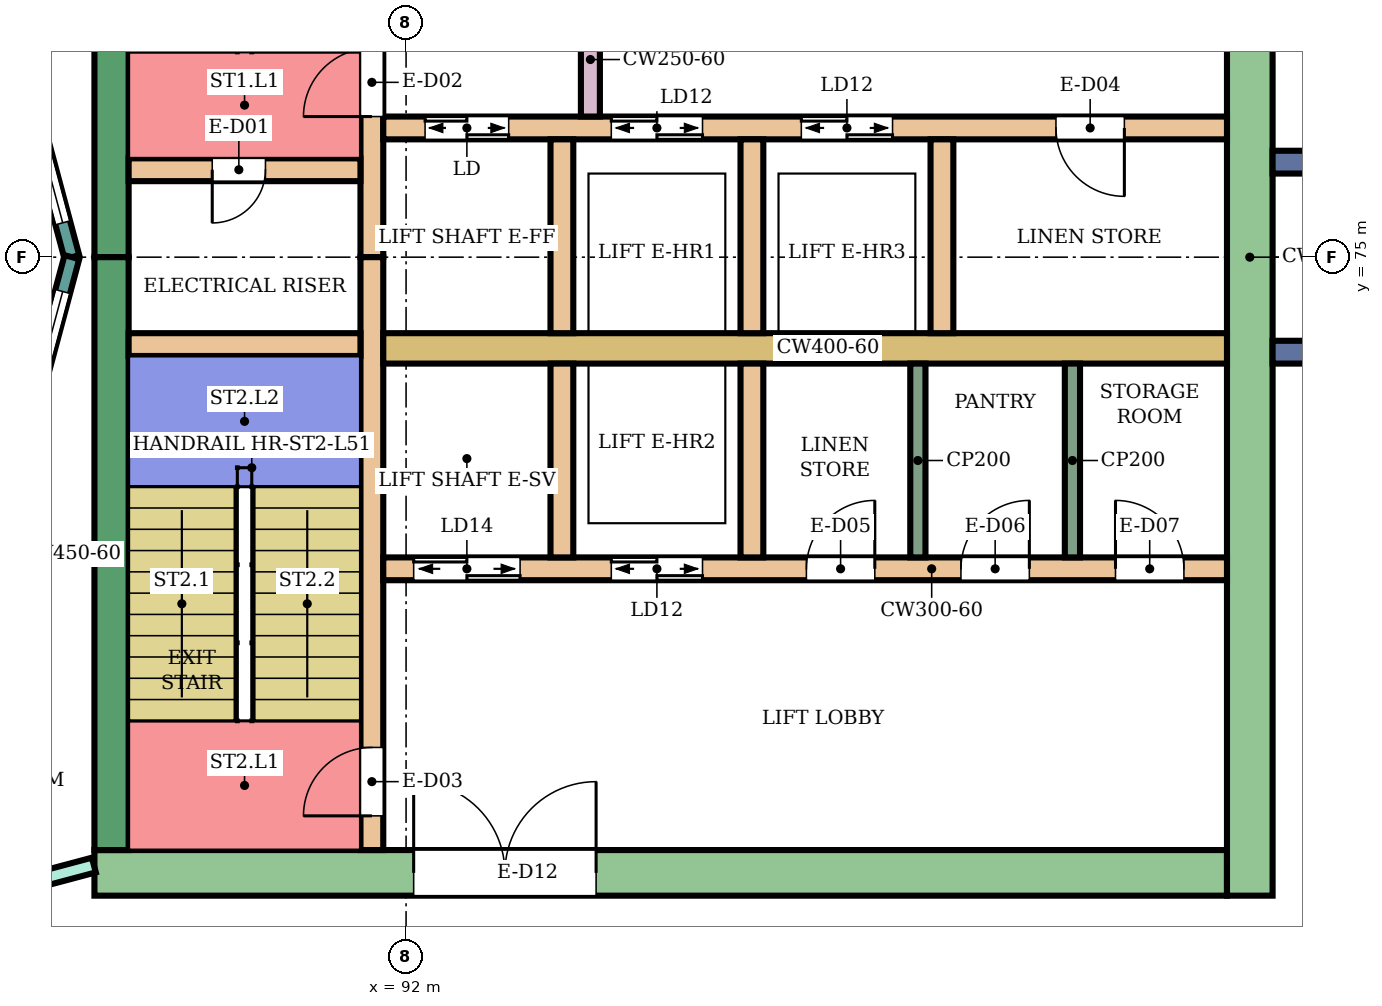
"""IFC4 building model, lengths in metres.
Left out: names, types, materials, properties, quantities, classifications, styles, units other than length and angle.
Written with IfcOpenShell. Run it as: python <this file> out.ifc"""

import sys

from ifc_helpers import new_model, si_unit, direction, frame, frame_2d, origin, place, context, subcontext, project, spatial, rectangle, extrude, element, fill, save


model = new_model("IFC4")
c1 = context("Model", 3, precision=1e-05, world=origin(), true_north=direction((0.0, 1.0)))
c2 = subcontext(c1, "Body", "Model", "MODEL_VIEW")
j1 = project(units=[si_unit("LENGTHUNIT", "METRE"), si_unit("PLANEANGLEUNIT", "RADIAN")], contexts=[c1])
p1 = place(None, origin())
s1 = spatial("IfcSite", under=j1, at=p1, CompositionType="ELEMENT")
p2 = place(p1, origin())
s2 = spatial("IfcBuilding", under=s1, at=p2, CompositionType="ELEMENT")
p3 = place(p2, frame((0.0, 0.0, 220.9)))
s3 = spatial("IfcBuildingStorey", under=s2, at=p3, CompositionType="ELEMENT", Elevation=220.9)
p4 = place(p3, frame((87.9, 66.9, 0.0), z_axis=(0.0, 0.0, 1.0), x_axis=(1.0, 0.0, 0.0)))
e1 = element("IfcWall", 1, at=p4, inside=s3, PredefinedType="SHEAR", context=c2, shape_type="SweptSolid", body=[
    extrude(rectangle(XDim=14.9, YDim=0.6, at=frame_2d((7.45, 0.0))), origin(), (0.0, 0.0, 1.0), 3.88),
])
p5 = place(p4, frame((4.2, 0.0, 0.0)))
e2 = element("IfcOpeningElement", 2, at=p5, cuts=e1, PredefinedType="OPENING", context=c2, shape_type="SweptSolid", body=[
    extrude(rectangle(XDim=2.4, YDim=2.4, at=frame_2d((1.2, 1.2))), frame((0.0, 0.31, 0.0), z_axis=(0.0, -1.0, 0.0), x_axis=(1.0, 0.0, 0.0)), (0.0, 0.0, 1.0), 0.62),
])
for number, where, z_axis, x_axis in (
    (3, (88.125, 75.0, 0.0), (0.0, 0.0, 1.0), (0.0, 1.0, 0.0)),
    (4, (88.125, 67.2, 0.0), (0.0, 0.0, 1.0), (0.0, 1.0, 0.0)),
):
    element("IfcWall", number, at=place(p3, frame(where, z_axis=z_axis, x_axis=x_axis)), inside=s3, PredefinedType="SHEAR", context=c2, shape_type="SweptSolid", body=[
        extrude(rectangle(XDim=7.8, YDim=0.45, at=frame_2d((3.9, 0.0))), origin(), (0.0, 0.0, 1.0), 3.88),
    ])
p6 = place(p3, frame((103.1, 66.6, 0.0), z_axis=(0.0, 0.0, 1.0), x_axis=(0.0, 1.0, 0.0)))
e5 = element("IfcWall", 5, at=p6, inside=s3, PredefinedType="SHEAR", context=c2, shape_type="SweptSolid", body=[
    extrude(rectangle(XDim=16.8, YDim=0.6, at=frame_2d((8.4, 0.0))), origin(), (0.0, 0.0, 1.0), 3.88),
])
p7 = place(p3, frame((91.55, 75.0, 0.0), z_axis=(0.0, 0.0, 1.0), x_axis=(0.0, 1.0, 0.0)))
e6 = element("IfcWall", 6, at=p7, inside=s3, PredefinedType="SHEAR", context=c2, shape_type="SweptSolid", body=[
    extrude(rectangle(XDim=7.8, YDim=0.3, at=frame_2d((3.9, 0.0))), origin(), (0.0, 0.0, 1.0), 3.88),
])
p8 = place(p7, frame((1.85, 0.0, 0.0)))
e7 = element("IfcOpeningElement", 7, at=p8, cuts=e6, PredefinedType="OPENING", context=c2, shape_type="SweptSolid", body=[
    extrude(rectangle(XDim=0.9, YDim=2.1, at=frame_2d((0.45, 1.05))), frame((0.0, 0.16, 0.0), z_axis=(0.0, -1.0, 0.0), x_axis=(1.0, 0.0, 0.0)), (0.0, 0.0, 1.0), 0.32),
])
p9 = place(p3, frame((91.55, 67.2, 0.0), z_axis=(0.0, 0.0, 1.0), x_axis=(0.0, 1.0, 0.0)))
e8 = element("IfcWall", 8, at=p9, inside=s3, PredefinedType="SHEAR", context=c2, shape_type="SweptSolid", body=[
    extrude(rectangle(XDim=7.8, YDim=0.3, at=frame_2d((3.9, 0.0))), origin(), (0.0, 0.0, 1.0), 3.88),
])
p10 = place(p9, frame((0.45, 0.0, 0.0)))
e9 = element("IfcOpeningElement", 9, at=p10, cuts=e8, PredefinedType="OPENING", context=c2, shape_type="SweptSolid", body=[
    extrude(rectangle(XDim=0.9, YDim=2.1, at=frame_2d((0.45, 1.05))), frame((0.0, 0.16, 0.0), z_axis=(0.0, -1.0, 0.0), x_axis=(1.0, 0.0, 0.0)), (0.0, 0.0, 1.0), 0.32),
])
p11 = place(p3, frame((88.35, 76.15, 0.0), z_axis=(0.0, 0.0, 1.0), x_axis=(1.0, 0.0, 0.0)))
e10 = element("IfcWall", 10, at=p11, inside=s3, PredefinedType="SHEAR", context=c2, shape_type="SweptSolid", body=[
    extrude(rectangle(XDim=3.05, YDim=0.3, at=frame_2d((1.525, 0.0))), origin(), (0.0, 0.0, 1.0), 3.88),
])
p12 = place(p11, frame((1.1, 0.0, 0.0)))
e11 = element("IfcOpeningElement", 11, at=p12, cuts=e10, PredefinedType="OPENING", context=c2, shape_type="SweptSolid", body=[
    extrude(rectangle(XDim=0.7, YDim=2.0, at=frame_2d((0.35, 1.0))), frame((0.0, 0.16, 0.0), z_axis=(0.0, -1.0, 0.0), x_axis=(1.0, 0.0, 0.0)), (0.0, 0.0, 1.0), 0.32),
])
p13 = place(p3, frame((88.35, 73.85, 0.0), z_axis=(0.0, 0.0, 1.0), x_axis=(1.0, 0.0, 0.0)))
e12 = element("IfcWall", 12, at=p13, inside=s3, PredefinedType="SHEAR", context=c2, shape_type="SweptSolid", body=[
    extrude(rectangle(XDim=3.05, YDim=0.3, at=frame_2d((1.525, 0.0))), origin(), (0.0, 0.0, 1.0), 3.88),
])
p14 = place(p3, frame((91.7, 76.7, 0.0), z_axis=(0.0, 0.0, 1.0), x_axis=(1.0, 0.0, 0.0)))
e13 = element("IfcWall", 13, at=p14, inside=s3, PredefinedType="SHEAR", context=c2, shape_type="SweptSolid", body=[
    extrude(rectangle(XDim=11.1, YDim=0.3, at=frame_2d((5.55, 0.0))), origin(), (0.0, 0.0, 1.0), 3.88),
])
p15 = place(p14, frame((0.55, 0.0, 0.0)))
e14 = element("IfcOpeningElement", 14, at=p15, cuts=e13, PredefinedType="OPENING", context=c2, shape_type="SweptSolid", body=[
    extrude(rectangle(XDim=1.1, YDim=2.1, at=frame_2d((0.55, 1.05))), frame((0.0, 0.16, 0.0), z_axis=(0.0, -1.0, 0.0), x_axis=(1.0, 0.0, 0.0)), (0.0, 0.0, 1.0), 0.32),
])
p16 = place(p14, frame((3.0, 0.0, 0.0)))
e15 = element("IfcOpeningElement", 15, at=p16, cuts=e13, PredefinedType="OPENING", context=c2, shape_type="SweptSolid", body=[
    extrude(rectangle(XDim=1.2, YDim=2.1, at=frame_2d((0.6, 1.05))), frame((0.0, 0.16, 0.0), z_axis=(0.0, -1.0, 0.0), x_axis=(1.0, 0.0, 0.0)), (0.0, 0.0, 1.0), 0.32),
])
p17 = place(p14, frame((5.5, 0.0, 0.0)))
e16 = element("IfcOpeningElement", 16, at=p17, cuts=e13, PredefinedType="OPENING", context=c2, shape_type="SweptSolid", body=[
    extrude(rectangle(XDim=1.2, YDim=2.1, at=frame_2d((0.6, 1.05))), frame((0.0, 0.16, 0.0), z_axis=(0.0, -1.0, 0.0), x_axis=(1.0, 0.0, 0.0)), (0.0, 0.0, 1.0), 0.32),
])
p18 = place(p14, frame((8.85, 0.0, 0.0)))
e17 = element("IfcOpeningElement", 17, at=p18, cuts=e13, PredefinedType="OPENING", context=c2, shape_type="SweptSolid", body=[
    extrude(rectangle(XDim=0.9, YDim=2.1, at=frame_2d((0.45, 1.05))), frame((0.0, 0.16, 0.0), z_axis=(0.0, -1.0, 0.0), x_axis=(1.0, 0.0, 0.0)), (0.0, 0.0, 1.0), 0.32),
])
p19 = place(p3, frame((91.7, 73.8, 0.0), z_axis=(0.0, 0.0, 1.0), x_axis=(1.0, 0.0, 0.0)))
e18 = element("IfcWall", 18, at=p19, inside=s3, PredefinedType="SHEAR", context=c2, shape_type="SweptSolid", body=[
    extrude(rectangle(XDim=11.1, YDim=0.4, at=frame_2d((5.55, 0.0))), origin(), (0.0, 0.0, 1.0), 3.88),
])
p20 = place(p3, frame((91.7, 70.9, 0.0), z_axis=(0.0, 0.0, 1.0), x_axis=(1.0, 0.0, 0.0)))
e19 = element("IfcWall", 19, at=p20, inside=s3, PredefinedType="SHEAR", context=c2, shape_type="SweptSolid", body=[
    extrude(rectangle(XDim=11.1, YDim=0.3, at=frame_2d((5.55, 0.0))), origin(), (0.0, 0.0, 1.0), 3.88),
])
p21 = place(p20, frame((0.4, 0.0, 0.0)))
e20 = element("IfcOpeningElement", 20, at=p21, cuts=e19, PredefinedType="OPENING", context=c2, shape_type="SweptSolid", body=[
    extrude(rectangle(XDim=1.4, YDim=2.1, at=frame_2d((0.7, 1.05))), frame((0.0, 0.16, 0.0), z_axis=(0.0, -1.0, 0.0), x_axis=(1.0, 0.0, 0.0)), (0.0, 0.0, 1.0), 0.32),
])
p22 = place(p20, frame((3.0, 0.0, 0.0)))
e21 = element("IfcOpeningElement", 21, at=p22, cuts=e19, PredefinedType="OPENING", context=c2, shape_type="SweptSolid", body=[
    extrude(rectangle(XDim=1.2, YDim=2.1, at=frame_2d((0.6, 1.05))), frame((0.0, 0.16, 0.0), z_axis=(0.0, -1.0, 0.0), x_axis=(1.0, 0.0, 0.0)), (0.0, 0.0, 1.0), 0.32),
])
p23 = place(p20, frame((5.567, 0.0, 0.0)))
e22 = element("IfcOpeningElement", 22, at=p23, cuts=e19, PredefinedType="OPENING", context=c2, shape_type="SweptSolid", body=[
    extrude(rectangle(XDim=0.9, YDim=2.1, at=frame_2d((0.45, 1.05))), frame((0.0, 0.16, 0.0), z_axis=(0.0, -1.0, 0.0), x_axis=(1.0, 0.0, 0.0)), (0.0, 0.0, 1.0), 0.32),
])
p24 = place(p20, frame((7.6, 0.0, 0.0)))
e23 = element("IfcOpeningElement", 23, at=p24, cuts=e19, PredefinedType="OPENING", context=c2, shape_type="SweptSolid", body=[
    extrude(rectangle(XDim=0.9, YDim=2.1, at=frame_2d((0.45, 1.05))), frame((0.0, 0.16, 0.0), z_axis=(0.0, -1.0, 0.0), x_axis=(1.0, 0.0, 0.0)), (0.0, 0.0, 1.0), 0.32),
])
p25 = place(p20, frame((9.633, 0.0, 0.0)))
e24 = element("IfcOpeningElement", 24, at=p25, cuts=e19, PredefinedType="OPENING", context=c2, shape_type="SweptSolid", body=[
    extrude(rectangle(XDim=0.9, YDim=2.1, at=frame_2d((0.45, 1.05))), frame((0.0, 0.16, 0.0), z_axis=(0.0, -1.0, 0.0), x_axis=(1.0, 0.0, 0.0)), (0.0, 0.0, 1.0), 0.32),
])
for number, where, z_axis, x_axis in (
    (25, (94.05, 74.0, 0.0), (0.0, 0.0, 1.0), (0.0, 1.0, 0.0)),
    (26, (96.55, 74.0, 0.0), (0.0, 0.0, 1.0), (0.0, 1.0, 0.0)),
    (27, (99.05, 74.0, 0.0), (0.0, 0.0, 1.0), (0.0, 1.0, 0.0)),
    (28, (94.05, 71.05, 0.0), (0.0, 0.0, 1.0), (0.0, 1.0, 0.0)),
    (29, (96.55, 71.05, 0.0), (0.0, 0.0, 1.0), (0.0, 1.0, 0.0)),
):
    element("IfcWall", number, at=place(p3, frame(where, z_axis=z_axis, x_axis=x_axis)), inside=s3, PredefinedType="SHEAR", context=c2, shape_type="SweptSolid", body=[
        extrude(rectangle(XDim=2.55, YDim=0.3, at=frame_2d((1.275, 0.0))), origin(), (0.0, 0.0, 1.0), 3.88),
    ])
p26 = place(p3, frame((94.425, 76.85, 0.0), z_axis=(0.0, 0.0, 1.0), x_axis=(0.0, 1.0, 0.0)))
e30 = element("IfcWall", 30, at=p26, inside=s3, PredefinedType="SHEAR", context=c2, shape_type="SweptSolid", body=[
    extrude(rectangle(XDim=1.5, YDim=0.25, at=frame_2d((0.75, 0.0))), origin(), (0.0, 0.0, 1.0), 3.88),
])
for number, where, z_axis, x_axis in (
    (31, (103.4, 73.75, 0.0), (0.0, 0.0, 1.0), (1.0, 0.0, 0.0)),
    (32, (103.4, 76.25, 0.0), (0.0, 0.0, 1.0), (1.0, 0.0, 0.0)),
):
    element("IfcWall", number, at=place(p3, frame(where, z_axis=z_axis, x_axis=x_axis)), inside=s3, PredefinedType="NOTDEFINED", context=c2, shape_type="SweptSolid", body=[
        extrude(rectangle(XDim=2.416, YDim=0.3, at=frame_2d((1.208, 0.0))), origin(), (0.0, 0.0, 1.0), 4.2),
    ])
p27 = place(p3, frame((87.604, 75.0, 0.0), z_axis=(0.0, 0.0, 1.0), x_axis=(-0.258789828301, 0.965933654434, 0.0)))
e33 = element("IfcWall", 33, at=p27, inside=s3, PredefinedType="NOTDEFINED", context=c2, shape_type="SweptSolid", body=[
    extrude(rectangle(XDim=3.936, YDim=0.2, at=frame_2d((1.968, 0.0))), origin(), (0.0, 0.0, 1.0), 4.2),
])
p28 = place(p27, frame((0.468, 0.0, 0.9)))
e34 = element("IfcOpeningElement", 34, at=p28, cuts=e33, PredefinedType="OPENING", context=c2, shape_type="SweptSolid", body=[
    extrude(rectangle(XDim=3.0, YDim=2.3, at=frame_2d((1.5, 1.15))), frame((0.0, 0.11, 0.0), z_axis=(0.0, -1.0, 0.0), x_axis=(1.0, 0.0, 0.0)), (0.0, 0.0, 1.0), 0.22),
])
p29 = place(p3, frame((86.585, 71.198, 0.0), z_axis=(0.0, 0.0, 1.0), x_axis=(0.258789828301, 0.965933654434, 0.0)))
e35 = element("IfcWall", 35, at=p29, inside=s3, PredefinedType="NOTDEFINED", context=c2, shape_type="SweptSolid", body=[
    extrude(rectangle(XDim=3.936, YDim=0.2, at=frame_2d((1.968, 0.0))), origin(), (0.0, 0.0, 1.0), 4.2),
])
p30 = place(p29, frame((0.468, 0.0, 0.9)))
e36 = element("IfcOpeningElement", 36, at=p30, cuts=e35, PredefinedType="OPENING", context=c2, shape_type="SweptSolid", body=[
    extrude(rectangle(XDim=3.0, YDim=2.3, at=frame_2d((1.5, 1.15))), frame((0.0, 0.11, 0.0), z_axis=(0.0, -1.0, 0.0), x_axis=(1.0, 0.0, 0.0)), (0.0, 0.0, 1.0), 0.22),
])
p31 = place(p3, frame((80.125, 64.932, 0.0), z_axis=(0.0, 0.0, 1.0), x_axis=(0.966236955806, 0.257655089674, 0.0)))
e37 = element("IfcWall", 37, at=p31, inside=s3, PredefinedType="PARTITIONING", context=c2, shape_type="SweptSolid", body=[
    extrude(rectangle(XDim=8.039, YDim=0.2, at=frame_2d((4.02, 0.0))), origin(), (0.0, 0.0, 1.0), 3.75),
])
p32 = place(p31, frame((6.298, 0.0, 0.0)))
e38 = element("IfcOpeningElement", 38, at=p32, cuts=e37, PredefinedType="OPENING", context=c2, shape_type="SweptSolid", body=[
    extrude(rectangle(XDim=0.9, YDim=2.1, at=frame_2d((0.45, 1.05))), frame((0.0, 0.11, 0.0), z_axis=(0.0, -1.0, 0.0), x_axis=(1.0, 0.0, 0.0)), (0.0, 0.0, 1.0), 0.22),
])
p33 = place(p31, frame((2.045, 0.0, 0.0)))
e39 = element("IfcOpeningElement", 39, at=p33, cuts=e37, PredefinedType="OPENING", context=c2, shape_type="SweptSolid", body=[
    extrude(rectangle(XDim=0.9, YDim=2.1, at=frame_2d((0.45, 1.05))), frame((0.0, 0.11, 0.0), z_axis=(0.0, -1.0, 0.0), x_axis=(1.0, 0.0, 0.0)), (0.0, 0.0, 1.0), 0.22),
])
for number, where, z_axis, x_axis in (
    (40, (98.733, 71.05, 0.0), (0.0, 0.0, 1.0), (0.0, 1.0, 0.0)),
    (41, (100.767, 71.05, 0.0), (0.0, 0.0, 1.0), (0.0, 1.0, 0.0)),
):
    element("IfcWall", number, at=place(p3, frame(where, z_axis=z_axis, x_axis=x_axis)), inside=s3, PredefinedType="PARTITIONING", context=c2, shape_type="SweptSolid", body=[
        extrude(rectangle(XDim=2.55, YDim=0.2, at=frame_2d((1.275, 0.0))), origin(), (0.0, 0.0, 1.0), 3.88),
    ])
p34 = place(p28, origin())
e42 = element("IfcWindow", 42, at=p34, inside=s3, PartitioningType="SINGLE_PANEL", PredefinedType="WINDOW", context=c2, shape_type="SweptSolid", body=[
    extrude(rectangle(XDim=3.0, YDim=2.3, at=frame_2d((1.5, 1.15))), frame((0.0, 0.03, 0.0), z_axis=(0.0, -1.0, 0.0), x_axis=(1.0, 0.0, 0.0)), (0.0, 0.0, 1.0), 0.06),
])
fill(e34, e42)
p35 = place(p30, origin())
e43 = element("IfcWindow", 43, at=p35, inside=s3, PartitioningType="SINGLE_PANEL", PredefinedType="WINDOW", context=c2, shape_type="SweptSolid", body=[
    extrude(rectangle(XDim=3.0, YDim=2.3, at=frame_2d((1.5, 1.15))), frame((0.0, 0.03, 0.0), z_axis=(0.0, -1.0, 0.0), x_axis=(1.0, 0.0, 0.0)), (0.0, 0.0, 1.0), 0.06),
])
fill(e36, e43)
p36 = place(p12, frame((0.7, 0.0, 0.0), z_axis=(0.0, 0.0, 1.0), x_axis=(-1.0, 0.0, 0.0)))
e44 = element("IfcDoor", 44, at=p36, inside=s3, OperationType="SINGLE_SWING_RIGHT", PredefinedType="DOOR", context=c2, shape_type="SweptSolid", body=[
    extrude(rectangle(XDim=0.7, YDim=2.0, at=frame_2d((0.35, 1.0))), frame((0.0, 0.025, 0.0), z_axis=(0.0, -1.0, 0.0), x_axis=(1.0, 0.0, 0.0)), (0.0, 0.0, 1.0), 0.05),
])
fill(e11, e44)
p37 = place(p8, origin())
e45 = element("IfcDoor", 45, at=p37, inside=s3, OperationType="SINGLE_SWING_LEFT", PredefinedType="DOOR", context=c2, shape_type="SweptSolid", body=[
    extrude(rectangle(XDim=0.9, YDim=2.1, at=frame_2d((0.45, 1.05))), frame((0.0, 0.025, 0.0), z_axis=(0.0, -1.0, 0.0), x_axis=(1.0, 0.0, 0.0)), (0.0, 0.0, 1.0), 0.05),
])
fill(e7, e45)
p38 = place(p10, origin())
e46 = element("IfcDoor", 46, at=p38, inside=s3, OperationType="SINGLE_SWING_LEFT", PredefinedType="DOOR", context=c2, shape_type="SweptSolid", body=[
    extrude(rectangle(XDim=0.9, YDim=2.1, at=frame_2d((0.45, 1.05))), frame((0.0, 0.025, 0.0), z_axis=(0.0, -1.0, 0.0), x_axis=(1.0, 0.0, 0.0)), (0.0, 0.0, 1.0), 0.05),
])
fill(e9, e46)
p39 = place(p15, origin())
e47 = element("IfcDoor", 47, at=p39, inside=s3, OperationType="DOUBLE_DOOR_SLIDING", PredefinedType="DOOR", context=c2, shape_type="SweptSolid", body=[
    extrude(rectangle(XDim=1.1, YDim=2.1, at=frame_2d((0.55, 1.05))), frame((0.0, 0.025, 0.0), z_axis=(0.0, -1.0, 0.0), x_axis=(1.0, 0.0, 0.0)), (0.0, 0.0, 1.0), 0.05),
])
fill(e14, e47)
p40 = place(p16, origin())
e48 = element("IfcDoor", 48, at=p40, inside=s3, OperationType="DOUBLE_DOOR_SLIDING", PredefinedType="DOOR", context=c2, shape_type="SweptSolid", body=[
    extrude(rectangle(XDim=1.2, YDim=2.1, at=frame_2d((0.6, 1.05))), frame((0.0, 0.025, 0.0), z_axis=(0.0, -1.0, 0.0), x_axis=(1.0, 0.0, 0.0)), (0.0, 0.0, 1.0), 0.05),
])
fill(e15, e48)
p41 = place(p17, origin())
e49 = element("IfcDoor", 49, at=p41, inside=s3, OperationType="DOUBLE_DOOR_SLIDING", PredefinedType="DOOR", context=c2, shape_type="SweptSolid", body=[
    extrude(rectangle(XDim=1.2, YDim=2.1, at=frame_2d((0.6, 1.05))), frame((0.0, 0.025, 0.0), z_axis=(0.0, -1.0, 0.0), x_axis=(1.0, 0.0, 0.0)), (0.0, 0.0, 1.0), 0.05),
])
fill(e16, e49)
p42 = place(p18, frame((0.9, 0.0, 0.0), z_axis=(0.0, 0.0, 1.0), x_axis=(-1.0, 0.0, 0.0)))
e50 = element("IfcDoor", 50, at=p42, inside=s3, OperationType="SINGLE_SWING_LEFT", PredefinedType="DOOR", context=c2, shape_type="SweptSolid", body=[
    extrude(rectangle(XDim=0.9, YDim=2.1, at=frame_2d((0.45, 1.05))), frame((0.0, 0.025, 0.0), z_axis=(0.0, -1.0, 0.0), x_axis=(1.0, 0.0, 0.0)), (0.0, 0.0, 1.0), 0.05),
])
fill(e17, e50)
p43 = place(p21, origin())
e51 = element("IfcDoor", 51, at=p43, inside=s3, OperationType="DOUBLE_DOOR_SLIDING", PredefinedType="DOOR", context=c2, shape_type="SweptSolid", body=[
    extrude(rectangle(XDim=1.4, YDim=2.1, at=frame_2d((0.7, 1.05))), frame((0.0, 0.025, 0.0), z_axis=(0.0, -1.0, 0.0), x_axis=(1.0, 0.0, 0.0)), (0.0, 0.0, 1.0), 0.05),
])
fill(e20, e51)
p44 = place(p22, origin())
e52 = element("IfcDoor", 52, at=p44, inside=s3, OperationType="DOUBLE_DOOR_SLIDING", PredefinedType="DOOR", context=c2, shape_type="SweptSolid", body=[
    extrude(rectangle(XDim=1.2, YDim=2.1, at=frame_2d((0.6, 1.05))), frame((0.0, 0.025, 0.0), z_axis=(0.0, -1.0, 0.0), x_axis=(1.0, 0.0, 0.0)), (0.0, 0.0, 1.0), 0.05),
])
fill(e21, e52)
p45 = place(p23, origin())
e53 = element("IfcDoor", 53, at=p45, inside=s3, OperationType="SINGLE_SWING_RIGHT", PredefinedType="DOOR", context=c2, shape_type="SweptSolid", body=[
    extrude(rectangle(XDim=0.9, YDim=2.1, at=frame_2d((0.45, 1.05))), frame((0.0, 0.025, 0.0), z_axis=(0.0, -1.0, 0.0), x_axis=(1.0, 0.0, 0.0)), (0.0, 0.0, 1.0), 0.05),
])
fill(e22, e53)
p46 = place(p24, origin())
e54 = element("IfcDoor", 54, at=p46, inside=s3, OperationType="SINGLE_SWING_RIGHT", PredefinedType="DOOR", context=c2, shape_type="SweptSolid", body=[
    extrude(rectangle(XDim=0.9, YDim=2.1, at=frame_2d((0.45, 1.05))), frame((0.0, 0.025, 0.0), z_axis=(0.0, -1.0, 0.0), x_axis=(1.0, 0.0, 0.0)), (0.0, 0.0, 1.0), 0.05),
])
fill(e23, e54)
p47 = place(p25, origin())
e55 = element("IfcDoor", 55, at=p47, inside=s3, OperationType="SINGLE_SWING_LEFT", PredefinedType="DOOR", context=c2, shape_type="SweptSolid", body=[
    extrude(rectangle(XDim=0.9, YDim=2.1, at=frame_2d((0.45, 1.05))), frame((0.0, 0.025, 0.0), z_axis=(0.0, -1.0, 0.0), x_axis=(1.0, 0.0, 0.0)), (0.0, 0.0, 1.0), 0.05),
])
fill(e24, e55)
p48 = place(p5, origin())
e56 = element("IfcDoor", 56, at=p48, inside=s3, OperationType="DOUBLE_DOOR_SINGLE_SWING", PredefinedType="DOOR", context=c2, shape_type="SweptSolid", body=[
    extrude(rectangle(XDim=2.4, YDim=2.4, at=frame_2d((1.2, 1.2))), frame((0.0, 0.025, 0.0), z_axis=(0.0, -1.0, 0.0), x_axis=(1.0, 0.0, 0.0)), (0.0, 0.0, 1.0), 0.05),
])
fill(e2, e56)
save(model, sys.argv[1])
